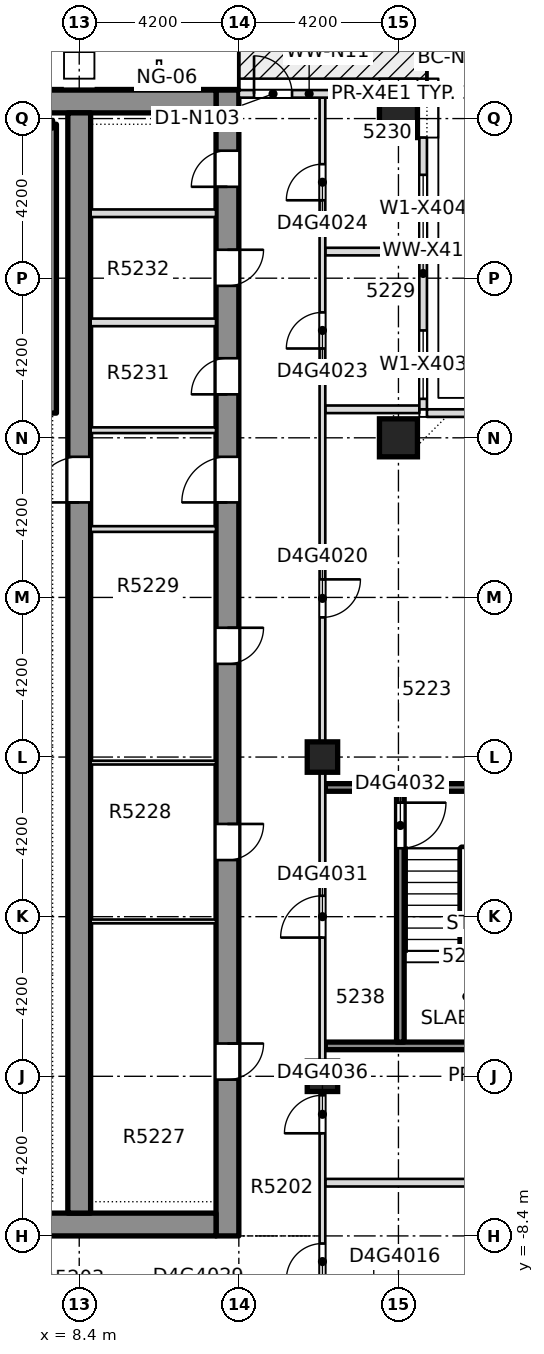
"""IFC4 building model, lengths in metres.
Left out: names, types, materials, properties, quantities, classifications, styles, units other than length and angle.
Written with IfcOpenShell. Run it as: python <this file> out.ifc"""

import sys

from ifc_helpers import new_model, si_unit, direction, frame, frame_2d, origin, origin_2d, place, context, subcontext, project, spatial, rectangle, extrude, element, fill, save


model = new_model("IFC4")
c1 = context("Model", 3, precision=1e-05, world=origin(), true_north=direction((0.0, 1.0)))
c2 = subcontext(c1, "Body", "Model", "MODEL_VIEW")
j1 = project(units=[si_unit("LENGTHUNIT", "METRE"), si_unit("PLANEANGLEUNIT", "RADIAN")], contexts=[c1])
p1 = place(None, origin())
s1 = spatial("IfcSite", under=j1, at=p1, CompositionType="ELEMENT")
p2 = place(p1, origin())
s2 = spatial("IfcBuilding", under=s1, at=p2, CompositionType="ELEMENT")
p3 = place(p2, frame((0.0, 0.0, 199.7)))
s3 = spatial("IfcBuildingStorey", under=s2, at=p3, CompositionType="ELEMENT", Elevation=199.7)
p4 = place(p3, frame((12.3, -8.4, -0.4), z_axis=(0.0, 0.0, 1.0), x_axis=(0.0, 1.0, 0.0)))
e1 = element("IfcWall", 1, at=p4, inside=s3, PredefinedType="SHEAR", context=c2, shape_type="SweptSolid", body=[
    extrude(rectangle(XDim=30.15, YDim=0.6, at=frame_2d((15.075, 0.0))), origin(), (0.0, 0.0, 1.0), 3.45),
])
p5 = place(p4, frame((4.113, 0.0, 0.4)))
e2 = element("IfcOpeningElement", 2, at=p5, cuts=e1, PredefinedType="OPENING", context=c2, shape_type="SweptSolid", body=[
    extrude(rectangle(XDim=0.95, YDim=2.1, at=frame_2d((0.475, 1.05))), frame((0.0, 0.31, 0.0), z_axis=(0.0, -1.0, 0.0), x_axis=(1.0, 0.0, 0.0)), (0.0, 0.0, 1.0), 0.62),
])
p6 = place(p4, frame((9.89, 0.0, 0.4)))
e3 = element("IfcOpeningElement", 3, at=p6, cuts=e1, PredefinedType="OPENING", context=c2, shape_type="SweptSolid", body=[
    extrude(rectangle(XDim=0.95, YDim=2.1, at=frame_2d((0.475, 1.05))), frame((0.0, 0.31, 0.0), z_axis=(0.0, -1.0, 0.0), x_axis=(1.0, 0.0, 0.0)), (0.0, 0.0, 1.0), 0.62),
])
p7 = place(p4, frame((15.052, 0.0, 0.4)))
e4 = element("IfcOpeningElement", 4, at=p7, cuts=e1, PredefinedType="OPENING", context=c2, shape_type="SweptSolid", body=[
    extrude(rectangle(XDim=0.95, YDim=2.1, at=frame_2d((0.475, 1.05))), frame((0.0, 0.31, 0.0), z_axis=(0.0, -1.0, 0.0), x_axis=(1.0, 0.0, 0.0)), (0.0, 0.0, 1.0), 0.62),
])
p8 = place(p4, frame((22.144, 0.0, 0.4)))
e5 = element("IfcOpeningElement", 5, at=p8, cuts=e1, PredefinedType="OPENING", context=c2, shape_type="SweptSolid", body=[
    extrude(rectangle(XDim=0.95, YDim=2.1, at=frame_2d((0.475, 1.05))), frame((0.0, 0.31, 0.0), z_axis=(0.0, -1.0, 0.0), x_axis=(1.0, 0.0, 0.0)), (0.0, 0.0, 1.0), 0.62),
])
p9 = place(p4, frame((24.998, 0.0, 0.4)))
e6 = element("IfcOpeningElement", 6, at=p9, cuts=e1, PredefinedType="OPENING", context=c2, shape_type="SweptSolid", body=[
    extrude(rectangle(XDim=0.95, YDim=2.1, at=frame_2d((0.475, 1.05))), frame((0.0, 0.31, 0.0), z_axis=(0.0, -1.0, 0.0), x_axis=(1.0, 0.0, 0.0)), (0.0, 0.0, 1.0), 0.62),
])
p10 = place(p4, frame((27.605, 0.0, 0.4)))
e7 = element("IfcOpeningElement", 7, at=p10, cuts=e1, PredefinedType="OPENING", context=c2, shape_type="SweptSolid", body=[
    extrude(rectangle(XDim=0.95, YDim=2.1, at=frame_2d((0.475, 1.05))), frame((0.0, 0.31, 0.0), z_axis=(0.0, -1.0, 0.0), x_axis=(1.0, 0.0, 0.0)), (0.0, 0.0, 1.0), 0.62),
])
p11 = place(p4, frame((19.3, 0.0, 0.4)))
e8 = element("IfcOpeningElement", 8, at=p11, cuts=e1, PredefinedType="OPENING", context=c2, shape_type="SweptSolid", body=[
    extrude(rectangle(XDim=1.2, YDim=2.1, at=frame_2d((0.6, 1.05))), frame((0.0, 0.31, 0.0), z_axis=(0.0, -1.0, 0.0), x_axis=(1.0, 0.0, 0.0)), (0.0, 0.0, 1.0), 0.62),
])
p12 = place(p3, frame((-12.0, -8.1, -0.4), z_axis=(0.0, 0.0, 1.0), x_axis=(1.0, 0.0, 0.0)))
e9 = element("IfcWall", 9, at=p12, inside=s3, PredefinedType="SHEAR", context=c2, shape_type="SweptSolid", body=[
    extrude(rectangle(XDim=24.0, YDim=0.6, at=frame_2d((12.0, 0.0))), origin(), (0.0, 0.0, 1.0), 3.45),
])
p13 = place(p12, frame((7.25, 0.0, 0.4)))
e10 = element("IfcOpeningElement", 10, at=p13, cuts=e9, PredefinedType="OPENING", context=c2, shape_type="SweptSolid", body=[
    extrude(rectangle(XDim=1.8, YDim=2.1, at=frame_2d((0.9, 1.05))), frame((0.0, 0.31, 0.0), z_axis=(0.0, -1.0, 0.0), x_axis=(1.0, 0.0, 0.0)), (0.0, 0.0, 1.0), 0.62),
])
p14 = place(p12, frame((14.95, 0.0, 0.4)))
e11 = element("IfcOpeningElement", 11, at=p14, cuts=e9, PredefinedType="OPENING", context=c2, shape_type="SweptSolid", body=[
    extrude(rectangle(XDim=1.8, YDim=2.1, at=frame_2d((0.9, 1.05))), frame((0.0, 0.31, 0.0), z_axis=(0.0, -1.0, 0.0), x_axis=(1.0, 0.0, 0.0)), (0.0, 0.0, 1.0), 0.62),
])
p15 = place(p3, frame((-12.0, 21.45, -0.4), z_axis=(0.0, 0.0, 1.0), x_axis=(1.0, 0.0, 0.0)))
e12 = element("IfcWall", 12, at=p15, inside=s3, PredefinedType="SHEAR", context=c2, shape_type="SweptSolid", body=[
    extrude(rectangle(XDim=24.0, YDim=0.6, at=frame_2d((12.0, 0.0))), origin(), (0.0, 0.0, 1.0), 3.45),
])
p16 = place(p3, frame((8.4, -7.8, -0.4), z_axis=(0.0, 0.0, 1.0), x_axis=(0.0, 1.0, 0.0)))
e13 = element("IfcWall", 13, at=p16, inside=s3, PredefinedType="SHEAR", context=c2, shape_type="SweptSolid", body=[
    extrude(rectangle(XDim=28.95, YDim=0.6, at=frame_2d((14.475, 0.0))), origin(), (0.0, 0.0, 1.0), 3.45),
])
p17 = place(p16, frame((18.7, 0.0, 0.4)))
e14 = element("IfcOpeningElement", 14, at=p17, cuts=e13, PredefinedType="OPENING", context=c2, shape_type="SweptSolid", body=[
    extrude(rectangle(XDim=1.2, YDim=2.1, at=frame_2d((0.6, 1.05))), frame((0.0, 0.31, 0.0), z_axis=(0.0, -1.0, 0.0), x_axis=(1.0, 0.0, 0.0)), (0.0, 0.0, 1.0), 0.62),
])
for number, where, z_axis, x_axis in (
    (15, (16.8, 12.6, -0.4), (0.0, 0.0, 1.0), (1.0, 0.0, 0.0)),
    (16, (16.8, 21.0, -0.4), (0.0, 0.0, 1.0), (1.0, 0.0, 0.0)),
):
    element("IfcColumn", number, at=place(p3, frame(where, z_axis=z_axis, x_axis=x_axis)), inside=s3, PredefinedType="COLUMN", context=c2, shape_type="SweptSolid", body=[
        extrude(rectangle(XDim=1.0, YDim=1.0, at=origin_2d()), origin(), (0.0, 0.0, 1.0), 3.45),
    ])
for number, where, z_axis, x_axis in (
    (17, (14.8, -4.2, -0.4), (0.0, 0.0, 1.0), (1.0, 0.0, 0.0)),
    (18, (14.8, 4.2, -0.4), (0.0, 0.0, 1.0), (1.0, 0.0, 0.0)),
):
    element("IfcColumn", number, at=place(p3, frame(where, z_axis=z_axis, x_axis=x_axis)), inside=s3, PredefinedType="COLUMN", context=c2, shape_type="SweptSolid", body=[
        extrude(rectangle(XDim=0.8, YDim=0.8, at=origin_2d()), origin(), (0.0, 0.0, 1.0), 3.45),
    ])
p18 = place(p3, frame((14.875, -7.0, 0.0), z_axis=(0.0, 0.0, 1.0), x_axis=(1.0, 0.0, 0.0)))
e19 = element("IfcWall", 19, at=p18, inside=s3, PredefinedType="PARTITIONING", context=c2, shape_type="SweptSolid", body=[
    extrude(rectangle(XDim=10.875, YDim=0.2, at=frame_2d((5.438, 0.0))), origin(), (0.0, 0.0, 1.0), 3.05),
])
p19 = place(p3, frame((14.875, -3.4, 0.0), z_axis=(0.0, 0.0, 1.0), x_axis=(1.0, 0.0, 0.0)))
e20 = element("IfcWall", 20, at=p19, inside=s3, PredefinedType="SOLIDWALL", context=c2, shape_type="SweptSolid", body=[
    extrude(rectangle(XDim=8.725, YDim=0.2, at=frame_2d((4.363, 0.0))), origin(), (0.0, 0.0, 1.0), 3.05),
])
p20 = place(p3, frame((14.875, 3.4, 0.0), z_axis=(0.0, 0.0, 1.0), x_axis=(1.0, 0.0, 0.0)))
e21 = element("IfcWall", 21, at=p20, inside=s3, PredefinedType="SOLIDWALL", context=c2, shape_type="SweptSolid", body=[
    extrude(rectangle(XDim=5.575, YDim=0.2, at=frame_2d((2.788, 0.0))), origin(), (0.0, 0.0, 1.0), 3.05),
])
for number, where, z_axis, x_axis in (
    (22, (14.875, 13.35, 0.0), (0.0, 0.0, 1.0), (1.0, 0.0, 0.0)),
    (23, (14.875, 17.5, 0.0), (0.0, 0.0, 1.0), (1.0, 0.0, 0.0)),
):
    element("IfcWall", number, at=place(p3, frame(where, z_axis=z_axis, x_axis=x_axis)), inside=s3, PredefinedType="PARTITIONING", context=c2, shape_type="SweptSolid", body=[
        extrude(rectangle(XDim=2.475, YDim=0.2, at=frame_2d((1.238, 0.0))), origin(), (0.0, 0.0, 1.0), 3.05),
    ])
p21 = place(p3, frame((14.8, -9.85, 0.0), z_axis=(0.0, 0.0, 1.0), x_axis=(0.0, 1.0, 0.0)))
e24 = element("IfcWall", 24, at=p21, inside=s3, PredefinedType="PARTITIONING", context=c2, shape_type="SweptSolid", body=[
    extrude(rectangle(XDim=31.4, YDim=0.15, at=frame_2d((15.7, 0.0))), origin(), (0.0, 0.0, 1.0), 3.05),
])
p22 = place(p21, frame((0.3, 0.0, 0.0)))
e25 = element("IfcOpeningElement", 25, at=p22, cuts=e24, PredefinedType="OPENING", context=c2, shape_type="SweptSolid", body=[
    extrude(rectangle(XDim=0.95, YDim=2.1, at=frame_2d((0.475, 1.05))), frame((0.0, 0.085, 0.0), z_axis=(0.0, -1.0, 0.0), x_axis=(1.0, 0.0, 0.0)), (0.0, 0.0, 1.0), 0.17),
])
p23 = place(p21, frame((17.725, 0.0, 0.0)))
e26 = element("IfcOpeningElement", 26, at=p23, cuts=e24, PredefinedType="OPENING", context=c2, shape_type="SweptSolid", body=[
    extrude(rectangle(XDim=1.0, YDim=2.1, at=frame_2d((0.5, 1.05))), frame((0.0, 0.085, 0.0), z_axis=(0.0, -1.0, 0.0), x_axis=(1.0, 0.0, 0.0)), (0.0, 0.0, 1.0), 0.17),
])
p24 = place(p21, frame((24.8, 0.0, 0.0)))
e27 = element("IfcOpeningElement", 27, at=p24, cuts=e24, PredefinedType="OPENING", context=c2, shape_type="SweptSolid", body=[
    extrude(rectangle(XDim=0.95, YDim=2.1, at=frame_2d((0.475, 1.05))), frame((0.0, 0.085, 0.0), z_axis=(0.0, -1.0, 0.0), x_axis=(1.0, 0.0, 0.0)), (0.0, 0.0, 1.0), 0.17),
])
p25 = place(p21, frame((28.7, 0.0, 0.0)))
e28 = element("IfcOpeningElement", 28, at=p25, cuts=e24, PredefinedType="OPENING", context=c2, shape_type="SweptSolid", body=[
    extrude(rectangle(XDim=0.95, YDim=2.1, at=frame_2d((0.475, 1.05))), frame((0.0, 0.085, 0.0), z_axis=(0.0, -1.0, 0.0), x_axis=(1.0, 0.0, 0.0)), (0.0, 0.0, 1.0), 0.17),
])
p26 = place(p21, frame((9.3, 0.0, 0.0)))
e29 = element("IfcOpeningElement", 29, at=p26, cuts=e24, PredefinedType="OPENING", context=c2, shape_type="SweptSolid", body=[
    extrude(rectangle(XDim=1.1, YDim=2.1, at=frame_2d((0.55, 1.05))), frame((0.0, 0.085, 0.0), z_axis=(0.0, -1.0, 0.0), x_axis=(1.0, 0.0, 0.0)), (0.0, 0.0, 1.0), 0.17),
])
p27 = place(p21, frame((4.15, 0.0, 0.0)))
e30 = element("IfcOpeningElement", 30, at=p27, cuts=e24, PredefinedType="OPENING", context=c2, shape_type="SweptSolid", body=[
    extrude(rectangle(XDim=1.0, YDim=2.1, at=frame_2d((0.5, 1.05))), frame((0.0, 0.085, 0.0), z_axis=(0.0, -1.0, 0.0), x_axis=(1.0, 0.0, 0.0)), (0.0, 0.0, 1.0), 0.17),
])
p28 = place(p3, frame((16.85, -3.3, 0.0), z_axis=(0.0, 0.0, 1.0), x_axis=(0.0, 1.0, 0.0)))
e31 = element("IfcWall", 31, at=p28, inside=s3, PredefinedType="SOLIDWALL", context=c2, shape_type="SweptSolid", body=[
    extrude(rectangle(XDim=6.6, YDim=0.2, at=frame_2d((3.3, 0.0))), origin(), (0.0, 0.0, 1.0), 3.05),
])
p29 = place(p28, frame((5.1, 0.0, 0.0)))
e32 = element("IfcOpeningElement", 32, at=p29, cuts=e31, PredefinedType="OPENING", context=c2, shape_type="SweptSolid", body=[
    extrude(rectangle(XDim=1.2, YDim=2.1, at=frame_2d((0.6, 1.05))), frame((0.0, 0.11, 0.0), z_axis=(0.0, -1.0, 0.0), x_axis=(1.0, 0.0, 0.0)), (0.0, 0.0, 1.0), 0.22),
])
p30 = place(p3, frame((24.7, 13.25, 0.0), z_axis=(0.0, 0.0, 1.0), x_axis=(-1.0, 0.0, 0.0)))
e33 = element("IfcWall", 33, at=p30, inside=s3, PredefinedType="STANDARD", context=c2, shape_type="SweptSolid", body=[
    extrude(rectangle(XDim=7.15, YDim=0.2, at=frame_2d((3.575, 0.0))), origin(), (0.0, 0.0, 1.0), 3.05),
])
p31 = place(p3, frame((17.45, 13.35, 0.0), z_axis=(0.0, 0.0, 1.0), x_axis=(0.0, 1.0, 0.0)))
e34 = element("IfcWall", 34, at=p31, inside=s3, PredefinedType="STANDARD", context=c2, shape_type="SweptSolid", body=[
    extrude(rectangle(XDim=7.15, YDim=0.2, at=frame_2d((3.575, 0.0))), origin(), (0.0, 0.0, 1.0), 3.05),
])
p32 = place(p31, frame((0.275, 0.0, 0.2)))
e35 = element("IfcOpeningElement", 35, at=p32, cuts=e34, PredefinedType="OPENING", context=c2, shape_type="SweptSolid", body=[
    extrude(rectangle(XDim=1.8, YDim=2.65, at=frame_2d((0.9, 1.325))), frame((0.0, 0.11, 0.0), z_axis=(0.0, -1.0, 0.0), x_axis=(1.0, 0.0, 0.0)), (0.0, 0.0, 1.0), 0.22),
])
p33 = place(p31, frame((4.37, 0.0, 0.2)))
e36 = element("IfcOpeningElement", 36, at=p33, cuts=e34, PredefinedType="OPENING", context=c2, shape_type="SweptSolid", body=[
    extrude(rectangle(XDim=1.8, YDim=2.65, at=frame_2d((0.9, 1.325))), frame((0.0, 0.11, 0.0), z_axis=(0.0, -1.0, 0.0), x_axis=(1.0, 0.0, 0.0)), (0.0, 0.0, 1.0), 0.22),
])
p34 = place(p3, frame((16.3, 21.65, 0.0), z_axis=(0.0, 0.0, 1.0), x_axis=(-1.0, 0.0, 0.0)))
e37 = element("IfcWall", 37, at=p34, inside=s3, PredefinedType="STANDARD", context=c2, shape_type="SweptSolid", body=[
    extrude(rectangle(XDim=3.7, YDim=0.2, at=frame_2d((1.85, 0.0))), origin(), (0.0, 0.0, 1.0), 3.05),
])
p35 = place(p34, frame((2.3, 0.0, 0.0)))
e38 = element("IfcOpeningElement", 38, at=p35, cuts=e37, PredefinedType="OPENING", context=c2, shape_type="SweptSolid", body=[
    extrude(rectangle(XDim=1.0, YDim=2.4, at=frame_2d((0.5, 1.2))), frame((0.0, 0.11, 0.0), z_axis=(0.0, -1.0, 0.0), x_axis=(1.0, 0.0, 0.0)), (0.0, 0.0, 1.0), 0.22),
])
for number, where, z_axis, x_axis in (
    (39, (8.701, -0.125, 0.0), (0.0, 0.0, 1.0), (1.0, 0.0, 0.0)),
    (40, (8.701, 4.054, 0.0), (0.0, 0.0, 1.0), (1.0, 0.0, 0.0)),
):
    element("IfcWall", number, at=place(p3, frame(where, z_axis=z_axis, x_axis=x_axis)), inside=s3, PredefinedType="PARTITIONING", context=c2, shape_type="SweptSolid", body=[
        extrude(rectangle(XDim=3.298, YDim=0.1, at=frame_2d((1.649, 0.0))), origin(), (0.0, 0.0, 1.0), 3.05),
    ])
for number, where, z_axis, x_axis in (
    (41, (8.701, 10.2, 0.0), (0.0, 0.0, 1.0), (1.0, 0.0, 0.0)),
    (42, (8.701, 12.8, 0.0), (0.0, 0.0, 1.0), (1.0, 0.0, 0.0)),
):
    element("IfcWall", number, at=place(p3, frame(where, z_axis=z_axis, x_axis=x_axis)), inside=s3, PredefinedType="PARTITIONING", context=c2, shape_type="SweptSolid", body=[
        extrude(rectangle(XDim=3.298, YDim=0.15, at=frame_2d((1.649, 0.0))), origin(), (0.0, 0.0, 1.0), 3.05),
    ])
for number, where, z_axis, x_axis in (
    (43, (8.701, 15.637, 0.0), (0.0, 0.0, 1.0), (1.0, 0.0, 0.0)),
    (44, (8.701, 18.509, 0.0), (0.0, 0.0, 1.0), (1.0, 0.0, 0.0)),
):
    element("IfcWall", number, at=place(p3, frame(where, z_axis=z_axis, x_axis=x_axis)), inside=s3, PredefinedType="PARTITIONING", context=c2, shape_type="SweptSolid", body=[
        extrude(rectangle(XDim=3.298, YDim=0.2, at=frame_2d((1.649, 0.0))), origin(), (0.0, 0.0, 1.0), 3.05),
    ])
p36 = place(p3, frame((7.7, 13.25, 0.0), z_axis=(0.0, 0.0, 1.0), x_axis=(0.0, 1.0, 0.0)))
e45 = element("IfcWall", 45, at=p36, inside=s3, PredefinedType="SOLIDWALL", context=c2, shape_type="SweptSolid", body=[
    extrude(rectangle(XDim=7.6, YDim=0.2, at=frame_2d((3.8, 0.0))), origin(), (0.0, 0.0, 1.0), 3.05),
])
p37 = place(p22, origin())
e46 = element("IfcDoor", 46, at=p37, inside=s3, OperationType="SINGLE_SWING_RIGHT", PredefinedType="DOOR", context=c2, shape_type="SweptSolid", body=[
    extrude(rectangle(XDim=0.95, YDim=2.1, at=frame_2d((0.475, 1.05))), frame((0.0, 0.025, 0.0), z_axis=(0.0, -1.0, 0.0), x_axis=(1.0, 0.0, 0.0)), (0.0, 0.0, 1.0), 0.05),
])
fill(e25, e46)
p38 = place(p23, origin())
e47 = element("IfcDoor", 47, at=p38, inside=s3, OperationType="SINGLE_SWING_LEFT", PredefinedType="DOOR", context=c2, shape_type="SweptSolid", body=[
    extrude(rectangle(XDim=1.0, YDim=2.1, at=frame_2d((0.5, 1.05))), frame((0.0, 0.025, 0.0), z_axis=(0.0, -1.0, 0.0), x_axis=(1.0, 0.0, 0.0)), (0.0, 0.0, 1.0), 0.05),
])
fill(e26, e47)
p39 = place(p24, origin())
e48 = element("IfcDoor", 48, at=p39, inside=s3, OperationType="SINGLE_SWING_RIGHT", PredefinedType="DOOR", context=c2, shape_type="SweptSolid", body=[
    extrude(rectangle(XDim=0.95, YDim=2.1, at=frame_2d((0.475, 1.05))), frame((0.0, 0.025, 0.0), z_axis=(0.0, -1.0, 0.0), x_axis=(1.0, 0.0, 0.0)), (0.0, 0.0, 1.0), 0.05),
])
fill(e27, e48)
p40 = place(p25, origin())
e49 = element("IfcDoor", 49, at=p40, inside=s3, OperationType="SINGLE_SWING_RIGHT", PredefinedType="DOOR", context=c2, shape_type="SweptSolid", body=[
    extrude(rectangle(XDim=0.95, YDim=2.1, at=frame_2d((0.475, 1.05))), frame((0.0, 0.025, 0.0), z_axis=(0.0, -1.0, 0.0), x_axis=(1.0, 0.0, 0.0)), (0.0, 0.0, 1.0), 0.05),
])
fill(e28, e49)
p41 = place(p26, origin())
e50 = element("IfcDoor", 50, at=p41, inside=s3, OperationType="SINGLE_SWING_LEFT", PredefinedType="DOOR", context=c2, shape_type="SweptSolid", body=[
    extrude(rectangle(XDim=1.1, YDim=2.1, at=frame_2d((0.55, 1.05))), frame((0.0, 0.025, 0.0), z_axis=(0.0, -1.0, 0.0), x_axis=(1.0, 0.0, 0.0)), (0.0, 0.0, 1.0), 0.05),
])
fill(e29, e50)
p42 = place(p29, origin())
e51 = element("IfcDoor", 51, at=p42, inside=s3, OperationType="SINGLE_SWING_LEFT", PredefinedType="DOOR", context=c2, shape_type="SweptSolid", body=[
    extrude(rectangle(XDim=1.2, YDim=2.1, at=frame_2d((0.6, 1.05))), frame((0.0, 0.025, 0.0), z_axis=(0.0, -1.0, 0.0), x_axis=(1.0, 0.0, 0.0)), (0.0, 0.0, 1.0), 0.05),
])
fill(e32, e51)
p43 = place(p27, origin())
e52 = element("IfcDoor", 52, at=p43, inside=s3, OperationType="SINGLE_SWING_RIGHT", PredefinedType="DOOR", context=c2, shape_type="SweptSolid", body=[
    extrude(rectangle(XDim=1.0, YDim=2.1, at=frame_2d((0.5, 1.05))), frame((0.0, 0.025, 0.0), z_axis=(0.0, -1.0, 0.0), x_axis=(1.0, 0.0, 0.0)), (0.0, 0.0, 1.0), 0.05),
])
fill(e30, e52)
p44 = place(p32, origin())
e53 = element("IfcWindow", 53, at=p44, inside=s3, PartitioningType="SINGLE_PANEL", PredefinedType="WINDOW", context=c2, shape_type="SweptSolid", body=[
    extrude(rectangle(XDim=1.8, YDim=2.65, at=frame_2d((0.9, 1.325))), frame((0.0, 0.03, 0.0), z_axis=(0.0, -1.0, 0.0), x_axis=(1.0, 0.0, 0.0)), (0.0, 0.0, 1.0), 0.06),
])
fill(e35, e53)
p45 = place(p33, origin())
e54 = element("IfcWindow", 54, at=p45, inside=s3, PartitioningType="SINGLE_PANEL", PredefinedType="WINDOW", context=c2, shape_type="SweptSolid", body=[
    extrude(rectangle(XDim=1.8, YDim=2.65, at=frame_2d((0.9, 1.325))), frame((0.0, 0.03, 0.0), z_axis=(0.0, -1.0, 0.0), x_axis=(1.0, 0.0, 0.0)), (0.0, 0.0, 1.0), 0.06),
])
fill(e36, e54)
p46 = place(p35, origin())
e55 = element("IfcDoor", 55, at=p46, inside=s3, OperationType="SINGLE_SWING_LEFT", PredefinedType="DOOR", context=c2, shape_type="SweptSolid", body=[
    extrude(rectangle(XDim=1.0, YDim=2.4, at=frame_2d((0.5, 1.2))), frame((0.0, 0.025, 0.0), z_axis=(0.0, -1.0, 0.0), x_axis=(1.0, 0.0, 0.0)), (0.0, 0.0, 1.0), 0.05),
])
fill(e38, e55)
p47 = place(p5, origin())
e56 = element("IfcDoor", 56, at=p47, inside=s3, OperationType="SINGLE_SWING_LEFT", PredefinedType="DOOR", context=c2, shape_type="SweptSolid", body=[
    extrude(rectangle(XDim=0.95, YDim=2.1, at=frame_2d((0.475, 1.05))), frame((0.0, 0.025, 0.0), z_axis=(0.0, -1.0, 0.0), x_axis=(1.0, 0.0, 0.0)), (0.0, 0.0, 1.0), 0.05),
])
fill(e2, e56)
p48 = place(p6, origin())
e57 = element("IfcDoor", 57, at=p48, inside=s3, OperationType="SINGLE_SWING_LEFT", PredefinedType="DOOR", context=c2, shape_type="SweptSolid", body=[
    extrude(rectangle(XDim=0.95, YDim=2.1, at=frame_2d((0.475, 1.05))), frame((0.0, 0.025, 0.0), z_axis=(0.0, -1.0, 0.0), x_axis=(1.0, 0.0, 0.0)), (0.0, 0.0, 1.0), 0.05),
])
fill(e3, e57)
p49 = place(p7, origin())
e58 = element("IfcDoor", 58, at=p49, inside=s3, OperationType="SINGLE_SWING_LEFT", PredefinedType="DOOR", context=c2, shape_type="SweptSolid", body=[
    extrude(rectangle(XDim=0.95, YDim=2.1, at=frame_2d((0.475, 1.05))), frame((0.0, 0.025, 0.0), z_axis=(0.0, -1.0, 0.0), x_axis=(1.0, 0.0, 0.0)), (0.0, 0.0, 1.0), 0.05),
])
fill(e4, e58)
p50 = place(p8, origin())
e59 = element("IfcDoor", 59, at=p50, inside=s3, OperationType="SINGLE_SWING_LEFT", PredefinedType="DOOR", context=c2, shape_type="SweptSolid", body=[
    extrude(rectangle(XDim=0.95, YDim=2.1, at=frame_2d((0.475, 1.05))), frame((0.0, 0.025, 0.0), z_axis=(0.0, -1.0, 0.0), x_axis=(1.0, 0.0, 0.0)), (0.0, 0.0, 1.0), 0.05),
])
fill(e5, e59)
p51 = place(p9, origin())
e60 = element("IfcDoor", 60, at=p51, inside=s3, OperationType="SINGLE_SWING_LEFT", PredefinedType="DOOR", context=c2, shape_type="SweptSolid", body=[
    extrude(rectangle(XDim=0.95, YDim=2.1, at=frame_2d((0.475, 1.05))), frame((0.0, 0.025, 0.0), z_axis=(0.0, -1.0, 0.0), x_axis=(1.0, 0.0, 0.0)), (0.0, 0.0, 1.0), 0.05),
])
fill(e6, e60)
p52 = place(p10, origin())
e61 = element("IfcDoor", 61, at=p52, inside=s3, OperationType="SINGLE_SWING_LEFT", PredefinedType="DOOR", context=c2, shape_type="SweptSolid", body=[
    extrude(rectangle(XDim=0.95, YDim=2.1, at=frame_2d((0.475, 1.05))), frame((0.0, 0.025, 0.0), z_axis=(0.0, -1.0, 0.0), x_axis=(1.0, 0.0, 0.0)), (0.0, 0.0, 1.0), 0.05),
])
fill(e7, e61)
p53 = place(p11, origin())
e62 = element("IfcDoor", 62, at=p53, inside=s3, OperationType="SINGLE_SWING_LEFT", PredefinedType="DOOR", context=c2, shape_type="SweptSolid", body=[
    extrude(rectangle(XDim=1.2, YDim=2.1, at=frame_2d((0.6, 1.05))), frame((0.0, 0.025, 0.0), z_axis=(0.0, -1.0, 0.0), x_axis=(1.0, 0.0, 0.0)), (0.0, 0.0, 1.0), 0.05),
])
fill(e8, e62)
p54 = place(p17, origin())
e63 = element("IfcDoor", 63, at=p54, inside=s3, OperationType="SINGLE_SWING_LEFT", PredefinedType="DOOR", context=c2, shape_type="SweptSolid", body=[
    extrude(rectangle(XDim=1.2, YDim=2.1, at=frame_2d((0.6, 1.05))), frame((0.0, 0.025, 0.0), z_axis=(0.0, -1.0, 0.0), x_axis=(1.0, 0.0, 0.0)), (0.0, 0.0, 1.0), 0.05),
])
fill(e14, e63)
save(model, sys.argv[1])
